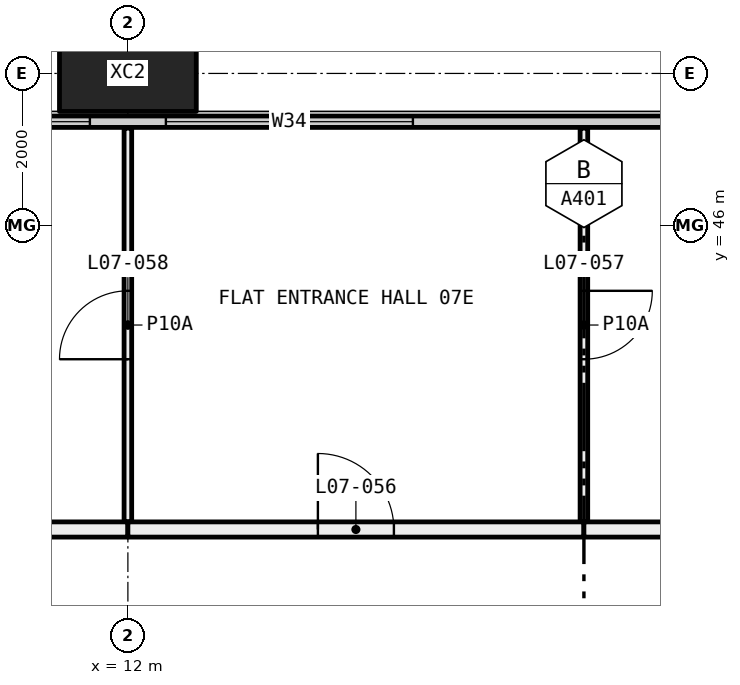
"""IFC4 building model, lengths in metres.
Left out: names, types, materials, properties, quantities, classifications, styles, units other than length and angle.
Written with IfcOpenShell. Run it as: python <this file> out.ifc"""

import sys

from ifc_helpers import new_model, si_unit, direction, frame, frame_2d, origin, origin_2d, place, context, subcontext, project, spatial, rectangle, hollow_rectangle, extrude, element, fill, save


model = new_model("IFC4")
c1 = context("Model", 3, precision=1e-05, world=origin(), true_north=direction((0.0, 1.0)))
c2 = subcontext(c1, "Body", "Model", "MODEL_VIEW")
j1 = project(units=[si_unit("LENGTHUNIT", "METRE"), si_unit("PLANEANGLEUNIT", "RADIAN")], contexts=[c1])
p1 = place(None, origin())
s1 = spatial("IfcSite", under=j1, at=p1, CompositionType="ELEMENT")
p2 = place(p1, origin())
s2 = spatial("IfcBuilding", under=s1, at=p2, CompositionType="ELEMENT")
p3 = place(p2, frame((0.0, 0.0, 36.9)))
s3 = spatial("IfcBuildingStorey", under=s2, at=p3, CompositionType="ELEMENT", Elevation=36.9)
p4 = place(p3, frame((12.0, 48.0, -0.4), z_axis=(0.0, 0.0, 1.0), x_axis=(1.0, 0.0, 0.0)))
e1 = element("IfcColumn", 1, at=p4, inside=s3, PredefinedType="COLUMN", context=c2, shape_type="SweptSolid", body=[
    extrude(hollow_rectangle(XDim=1.8, YDim=1.0, WallThickness=0.07, at=origin_2d()), origin(), (0.0, 0.0, 1.0), 3.45),
])
p5 = place(p3, frame((6.56, 47.365, 0.0), z_axis=(0.0, 0.0, 1.0), x_axis=(1.0, 0.0, 0.0)))
e2 = element("IfcWall", 2, at=p5, inside=s3, PredefinedType="ELEMENTEDWALL", context=c2, shape_type="SweptSolid", body=[
    extrude(rectangle(XDim=58.88, YDim=0.15, at=frame_2d((29.44, 0.0))), origin(), (0.0, 0.0, 1.0), 3.05),
])
p6 = place(p5, frame((0.44, 0.0, 0.45)))
e3 = element("IfcOpeningElement", 3, at=p6, cuts=e2, PredefinedType="OPENING", context=c2, shape_type="SweptSolid", body=[
    extrude(rectangle(XDim=4.5, YDim=2.55, at=frame_2d((2.25, 1.275))), frame((0.0, 0.085, 0.0), z_axis=(0.0, -1.0, 0.0), x_axis=(1.0, 0.0, 0.0)), (0.0, 0.0, 1.0), 0.17),
])
p7 = place(p5, frame((5.94, 0.0, 0.45)))
e4 = element("IfcOpeningElement", 4, at=p7, cuts=e2, PredefinedType="OPENING", context=c2, shape_type="SweptSolid", body=[
    extrude(rectangle(XDim=3.25, YDim=2.55, at=frame_2d((1.625, 1.275))), frame((0.0, 0.085, 0.0), z_axis=(0.0, -1.0, 0.0), x_axis=(1.0, 0.0, 0.0)), (0.0, 0.0, 1.0), 0.17),
])
p8 = place(p5, frame((13.69, 0.0, 0.45)))
e5 = element("IfcOpeningElement", 5, at=p8, cuts=e2, PredefinedType="OPENING", context=c2, shape_type="SweptSolid", body=[
    extrude(rectangle(XDim=3.25, YDim=2.55, at=frame_2d((1.625, 1.275))), frame((0.0, 0.085, 0.0), z_axis=(0.0, -1.0, 0.0), x_axis=(1.0, 0.0, 0.0)), (0.0, 0.0, 1.0), 0.17),
])
p9 = place(p5, frame((17.94, 0.0, 0.45)))
e6 = element("IfcOpeningElement", 6, at=p9, cuts=e2, PredefinedType="OPENING", context=c2, shape_type="SweptSolid", body=[
    extrude(rectangle(XDim=3.25, YDim=2.55, at=frame_2d((1.625, 1.275))), frame((0.0, 0.085, 0.0), z_axis=(0.0, -1.0, 0.0), x_axis=(1.0, 0.0, 0.0)), (0.0, 0.0, 1.0), 0.17),
])
p10 = place(p5, frame((26.94, 0.0, 0.45)))
e7 = element("IfcOpeningElement", 7, at=p10, cuts=e2, PredefinedType="OPENING", context=c2, shape_type="SweptSolid", body=[
    extrude(rectangle(XDim=2.0, YDim=2.55, at=frame_2d((1.0, 1.275))), frame((0.0, 0.085, 0.0), z_axis=(0.0, -1.0, 0.0), x_axis=(1.0, 0.0, 0.0)), (0.0, 0.0, 1.0), 0.17),
])
p11 = place(p5, frame((29.94, 0.0, 0.45)))
e8 = element("IfcOpeningElement", 8, at=p11, cuts=e2, PredefinedType="OPENING", context=c2, shape_type="SweptSolid", body=[
    extrude(rectangle(XDim=3.25, YDim=2.55, at=frame_2d((1.625, 1.275))), frame((0.0, 0.085, 0.0), z_axis=(0.0, -1.0, 0.0), x_axis=(1.0, 0.0, 0.0)), (0.0, 0.0, 1.0), 0.17),
])
p12 = place(p5, frame((37.69, 0.0, 0.45)))
e9 = element("IfcOpeningElement", 9, at=p12, cuts=e2, PredefinedType="OPENING", context=c2, shape_type="SweptSolid", body=[
    extrude(rectangle(XDim=3.25, YDim=2.55, at=frame_2d((1.625, 1.275))), frame((0.0, 0.085, 0.0), z_axis=(0.0, -1.0, 0.0), x_axis=(1.0, 0.0, 0.0)), (0.0, 0.0, 1.0), 0.17),
])
p13 = place(p5, frame((41.94, 0.0, 0.45)))
e10 = element("IfcOpeningElement", 10, at=p13, cuts=e2, PredefinedType="OPENING", context=c2, shape_type="SweptSolid", body=[
    extrude(rectangle(XDim=3.25, YDim=2.55, at=frame_2d((1.625, 1.275))), frame((0.0, 0.085, 0.0), z_axis=(0.0, -1.0, 0.0), x_axis=(1.0, 0.0, 0.0)), (0.0, 0.0, 1.0), 0.17),
])
p14 = place(p5, frame((50.94, 0.0, 0.45)))
e11 = element("IfcOpeningElement", 11, at=p14, cuts=e2, PredefinedType="OPENING", context=c2, shape_type="SweptSolid", body=[
    extrude(rectangle(XDim=2.0, YDim=2.55, at=frame_2d((1.0, 1.275))), frame((0.0, 0.085, 0.0), z_axis=(0.0, -1.0, 0.0), x_axis=(1.0, 0.0, 0.0)), (0.0, 0.0, 1.0), 0.17),
])
p15 = place(p5, frame((53.94, 0.0, 0.45)))
e12 = element("IfcOpeningElement", 12, at=p15, cuts=e2, PredefinedType="OPENING", context=c2, shape_type="SweptSolid", body=[
    extrude(rectangle(XDim=4.5, YDim=2.55, at=frame_2d((2.25, 1.275))), frame((0.0, 0.085, 0.0), z_axis=(0.0, -1.0, 0.0), x_axis=(1.0, 0.0, 0.0)), (0.0, 0.0, 1.0), 0.17),
])
p16 = place(p3, frame((12.0, 42.1, 0.0), z_axis=(0.0, 0.0, 1.0), x_axis=(0.0, 1.0, 0.0)))
e13 = element("IfcWall", 13, at=p16, inside=s3, PredefinedType="PARTITIONING", context=c2, shape_type="SweptSolid", body=[
    extrude(rectangle(XDim=5.18, YDim=0.1, at=frame_2d((2.59, 0.0))), origin(), (0.0, 0.0, 1.0), 3.05),
])
p17 = place(p16, frame((2.14, 0.0, 0.0)))
e14 = element("IfcOpeningElement", 14, at=p17, cuts=e13, PredefinedType="OPENING", context=c2, shape_type="SweptSolid", body=[
    extrude(rectangle(XDim=0.9, YDim=2.1, at=frame_2d((0.45, 1.05))), frame((0.0, 0.06, 0.0), z_axis=(0.0, -1.0, 0.0), x_axis=(1.0, 0.0, 0.0)), (0.0, 0.0, 1.0), 0.12),
])
p18 = place(p3, frame((10.2, 42.0, 0.0), z_axis=(0.0, 0.0, 1.0), x_axis=(1.0, 0.0, 0.0)))
e15 = element("IfcWall", 15, at=p18, inside=s3, PredefinedType="PARTITIONING", context=c2, shape_type="SweptSolid", body=[
    extrude(rectangle(XDim=1.8, YDim=0.2, at=frame_2d((0.9, 0.0))), origin(), (0.0, 0.0, 1.0), 3.05),
])
p19 = place(p3, frame((18.0, 42.1, 0.0), z_axis=(0.0, 0.0, 1.0), x_axis=(0.0, 1.0, 0.0)))
e16 = element("IfcWall", 16, at=p19, inside=s3, PredefinedType="PARTITIONING", context=c2, shape_type="SweptSolid", body=[
    extrude(rectangle(XDim=5.18, YDim=0.1, at=frame_2d((2.59, 0.0))), origin(), (0.0, 0.0, 1.0), 3.05),
])
p20 = place(p19, frame((2.14, 0.0, 0.0)))
e17 = element("IfcOpeningElement", 17, at=p20, cuts=e16, PredefinedType="OPENING", context=c2, shape_type="SweptSolid", body=[
    extrude(rectangle(XDim=0.9, YDim=2.1, at=frame_2d((0.45, 1.05))), frame((0.0, 0.06, 0.0), z_axis=(0.0, -1.0, 0.0), x_axis=(1.0, 0.0, 0.0)), (0.0, 0.0, 1.0), 0.12),
])
p21 = place(p3, frame((12.0, 42.0, 0.0), z_axis=(0.0, 0.0, 1.0), x_axis=(1.0, 0.0, 0.0)))
e18 = element("IfcWall", 18, at=p21, inside=s3, PredefinedType="PARTITIONING", context=c2, shape_type="SweptSolid", body=[
    extrude(rectangle(XDim=6.0, YDim=0.2, at=frame_2d((3.0, 0.0))), origin(), (0.0, 0.0, 1.0), 3.05),
])
p22 = place(p21, frame((2.5, 0.0, 0.0)))
e19 = element("IfcOpeningElement", 19, at=p22, cuts=e18, PredefinedType="OPENING", context=c2, shape_type="SweptSolid", body=[
    extrude(rectangle(XDim=1.0, YDim=2.1, at=frame_2d((0.5, 1.05))), frame((0.0, 0.11, 0.0), z_axis=(0.0, -1.0, 0.0), x_axis=(1.0, 0.0, 0.0)), (0.0, 0.0, 1.0), 0.22),
])
p23 = place(p3, frame((18.0, 42.0, 0.0), z_axis=(0.0, 0.0, 1.0), x_axis=(1.0, 0.0, 0.0)))
e20 = element("IfcWall", 20, at=p23, inside=s3, PredefinedType="PARTITIONING", context=c2, shape_type="SweptSolid", body=[
    extrude(rectangle(XDim=6.0, YDim=0.2, at=frame_2d((3.0, 0.0))), origin(), (0.0, 0.0, 1.0), 3.05),
])
p24 = place(p6, origin())
e21 = element("IfcWindow", 21, at=p24, inside=s3, PartitioningType="SINGLE_PANEL", PredefinedType="WINDOW", context=c2, shape_type="SweptSolid", body=[
    extrude(rectangle(XDim=4.5, YDim=2.55, at=frame_2d((2.25, 1.275))), frame((0.0, 0.03, 0.0), z_axis=(0.0, -1.0, 0.0), x_axis=(1.0, 0.0, 0.0)), (0.0, 0.0, 1.0), 0.06),
])
fill(e3, e21)
p25 = place(p7, origin())
e22 = element("IfcWindow", 22, at=p25, inside=s3, PartitioningType="SINGLE_PANEL", PredefinedType="WINDOW", context=c2, shape_type="SweptSolid", body=[
    extrude(rectangle(XDim=3.25, YDim=2.55, at=frame_2d((1.625, 1.275))), frame((0.0, 0.03, 0.0), z_axis=(0.0, -1.0, 0.0), x_axis=(1.0, 0.0, 0.0)), (0.0, 0.0, 1.0), 0.06),
])
fill(e4, e22)
p26 = place(p22, origin())
e23 = element("IfcDoor", 23, at=p26, inside=s3, OperationType="SINGLE_SWING_RIGHT", PredefinedType="DOOR", context=c2, shape_type="SweptSolid", body=[
    extrude(rectangle(XDim=1.0, YDim=2.1, at=frame_2d((0.5, 1.05))), frame((0.0, 0.025, 0.0), z_axis=(0.0, -1.0, 0.0), x_axis=(1.0, 0.0, 0.0)), (0.0, 0.0, 1.0), 0.05),
])
fill(e19, e23)
p27 = place(p20, frame((0.9, 0.0, 0.0), x_axis=(-1.0, 0.0, 0.0)))
e24 = element("IfcDoor", 24, at=p27, inside=s3, OperationType="SINGLE_SWING_RIGHT", PredefinedType="DOOR", context=c2, shape_type="SweptSolid", body=[
    extrude(rectangle(XDim=0.9, YDim=2.1, at=frame_2d((0.45, 1.05))), frame((0.0, 0.025, 0.0), z_axis=(0.0, -1.0, 0.0), x_axis=(1.0, 0.0, 0.0)), (0.0, 0.0, 1.0), 0.05),
])
fill(e17, e24)
p28 = place(p17, origin())
e25 = element("IfcDoor", 25, at=p28, inside=s3, OperationType="SINGLE_SWING_RIGHT", PredefinedType="DOOR", context=c2, shape_type="SweptSolid", body=[
    extrude(rectangle(XDim=0.9, YDim=2.1, at=frame_2d((0.45, 1.05))), frame((0.0, 0.025, 0.0), z_axis=(0.0, -1.0, 0.0), x_axis=(1.0, 0.0, 0.0)), (0.0, 0.0, 1.0), 0.05),
])
fill(e14, e25)
save(model, sys.argv[1])
